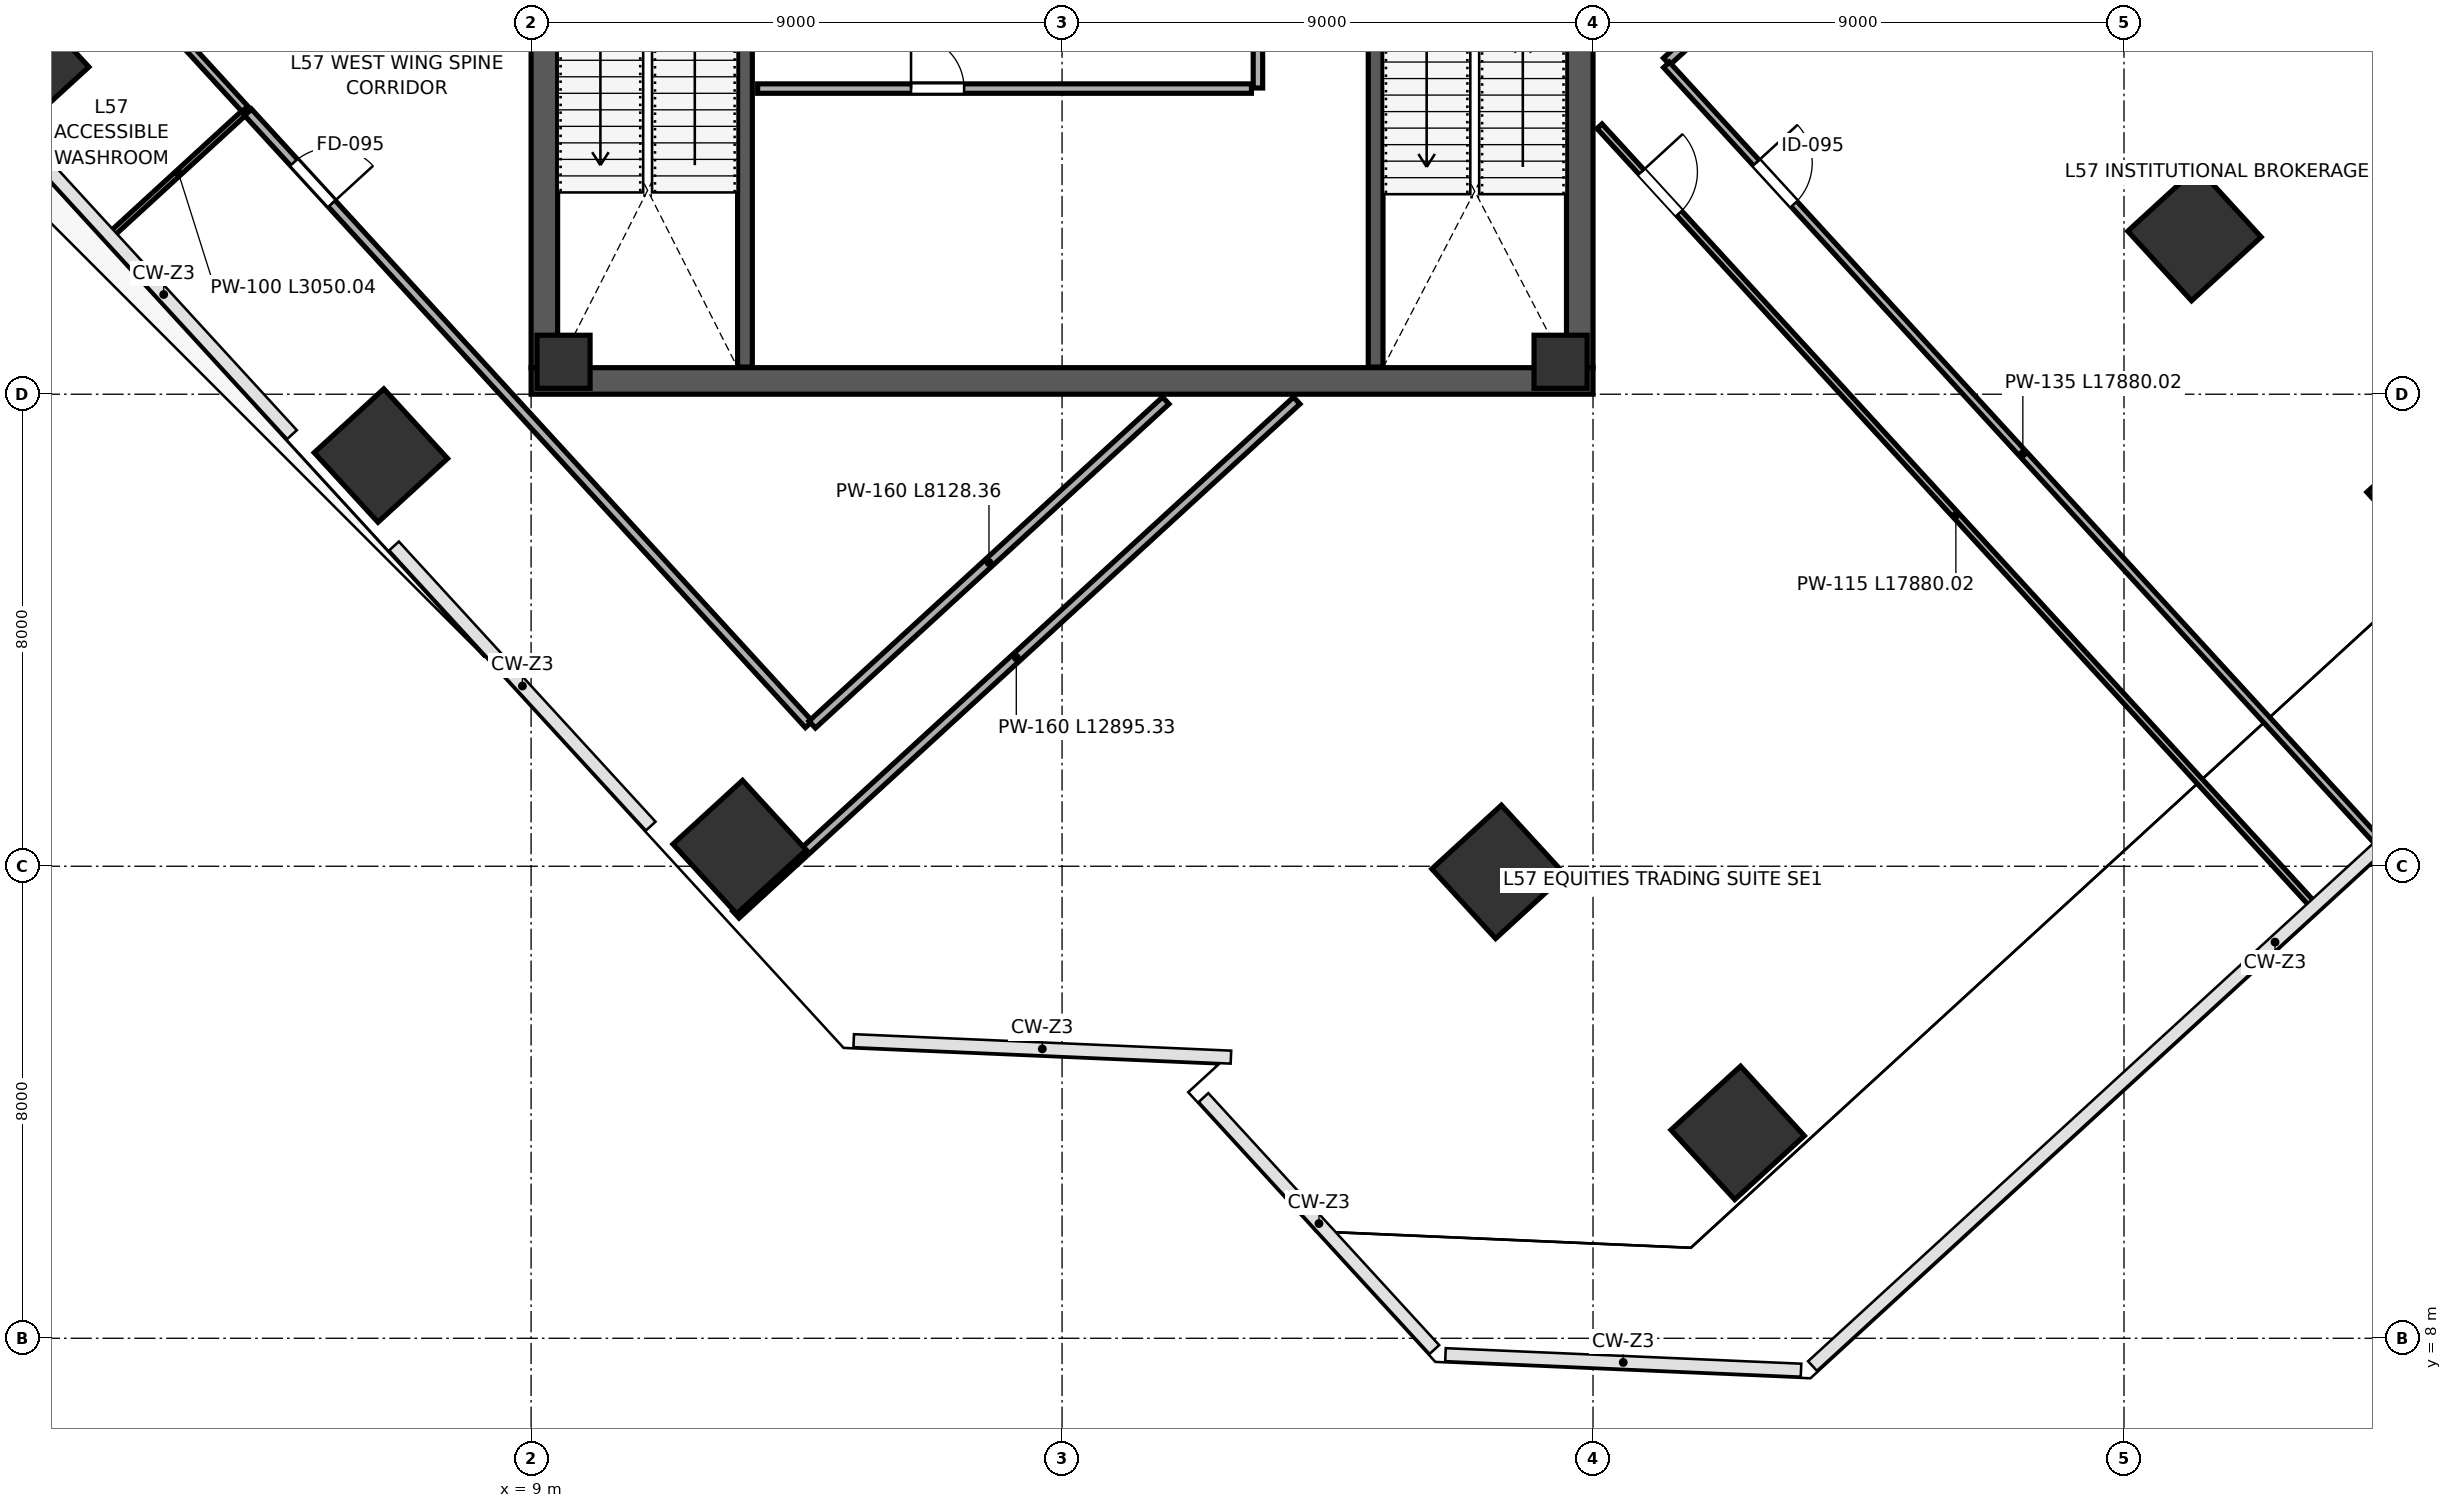
"""IFC4 building model, lengths in metres.
Left out: names, types, materials, properties, quantities, classifications, styles, units other than length and angle.
Written with IfcOpenShell. Run it as: python <this file> out.ifc"""

import sys

from ifc_helpers import new_model, si_unit, direction, frame, frame_2d, origin, origin_2d, place, context, subcontext, project, spatial, rectangle, extrude, source, transform, mapped, element, fill, save


model = new_model("IFC4")
c1 = context("Model", 3, precision=1e-05, world=origin(), true_north=direction((0.0, 1.0)))
c2 = subcontext(c1, "Body", "Model", "MODEL_VIEW")
j1 = project(units=[si_unit("LENGTHUNIT", "METRE"), si_unit("PLANEANGLEUNIT", "RADIAN")], contexts=[c1])
p1 = place(None, origin())
s1 = spatial("IfcSite", under=j1, at=p1, CompositionType="ELEMENT")
p2 = place(p1, origin())
s2 = spatial("IfcBuilding", under=s1, at=p2, CompositionType="ELEMENT")
p3 = place(p2, frame((0.0, 0.0, 254.2)))
s3 = spatial("IfcBuildingStorey", under=s2, at=p3, CompositionType="ELEMENT", Elevation=254.2)
m1 = source(origin(), c2, "Body", "SweptSolid", [
    extrude(rectangle(XDim=0.9, YDim=0.9, at=origin_2d()), origin(), (0.0, 0.0, 1.0), 4.198),
])
for number, where, z_axis, x_axis in (
    (1, (9.55, 24.55, 0.001), (0.0, 0.0, 1.0), (1.0, 0.0, 0.0)),
    (2, (26.45, 24.55, 0.001), (0.0, 0.0, 1.0), (1.0, 0.0, 0.0)),
):
    element("IfcColumn", number, at=place(p3, frame(where, z_axis=z_axis, x_axis=x_axis)), inside=s3, PredefinedType="COLUMN", context=c2, shape_type="MappedRepresentation", body=[
        mapped(m1, transform((0.0, 0.0, 0.0), scale=1.0)),
    ])
m2 = source(origin(), c2, "Body", "SweptSolid", [
    extrude(rectangle(XDim=1.6, YDim=1.6, at=origin_2d()), origin(), (0.0, 0.0, 1.0), 4.198),
])
for number, where, z_axis, x_axis in (
    (3, (0.374, 29.596, 0.001), (0.0, 0.0, 1.0), (-0.676, 0.737, 0.0)),
    (4, (6.454, 22.96, 0.001), (0.0, 0.0, 1.0), (-0.676, 0.737, 0.0)),
    (5, (12.535, 16.325, 0.001), (0.0, 0.0, 1.0), (-0.676, 0.737, 0.0)),
):
    element("IfcColumn", number, at=place(p3, frame(where, z_axis=z_axis, x_axis=x_axis)), inside=s3, PredefinedType="COLUMN", context=c2, shape_type="MappedRepresentation", body=[
        mapped(m2, transform((0.0, 0.0, 0.0), scale=1.0)),
    ])
m3 = source(origin(), c2, "Body", "SweptSolid", [
    extrude(rectangle(XDim=1.6, YDim=1.6, at=origin_2d()), origin(), (0.0, 0.0, 1.0), 4.198),
])
for number, where, z_axis, x_axis in (
    (6, (25.398, 15.905, 0.001), (0.0, 0.0, 1.0), (-0.676, 0.737, 0.0)),
    (7, (37.194, 26.714, 0.001), (0.0, 0.0, 1.0), (-0.676, 0.737, 0.0)),
):
    element("IfcColumn", number, at=place(p3, frame(where, z_axis=z_axis, x_axis=x_axis)), inside=s3, PredefinedType="COLUMN", context=c2, shape_type="MappedRepresentation", body=[
        mapped(m3, transform((0.0, 0.0, 0.0), scale=1.0)),
    ])
for number, where, z_axis, x_axis in (
    (8, (29.451, 11.481, 0.001), (0.0, 0.0, 1.0), (-0.676, 0.737, 0.0)),
    (9, (41.248, 22.291, 0.001), (0.0, 0.0, 1.0), (-0.676, 0.737, 0.0)),
):
    element("IfcColumn", number, at=place(p3, frame(where, z_axis=z_axis, x_axis=x_axis)), inside=s3, PredefinedType="COLUMN", context=c2, shape_type="MappedRepresentation", body=[
        mapped(m2, transform((0.0, 0.0, 0.0), scale=1.0)),
    ])
p4 = place(p3, frame((9.225, 24.45, 0.0), z_axis=(0.0, 0.0, 1.0), x_axis=(0.0, 1.0, 0.0)))
e10 = element("IfcWall", 10, at=p4, inside=s3, PredefinedType="SHEAR", context=c2, shape_type="SweptSolid", body=[
    extrude(rectangle(XDim=15.1, YDim=0.45, at=frame_2d((7.55, 0.0))), origin(), (0.0, 0.0, 1.0), 3.96),
])
p5 = place(p4, frame((8.7, 0.0, 0.0)))
e11 = element("IfcOpeningElement", 11, at=p5, cuts=e10, PredefinedType="OPENING", context=c2, shape_type="SweptSolid", body=[
    extrude(rectangle(XDim=1.15, YDim=2.2, at=frame_2d((0.575, 1.1))), frame((0.0, 0.235, 0.0), z_axis=(0.0, -1.0, 0.0), x_axis=(1.0, 0.0, 0.0)), (0.0, 0.0, 1.0), 0.47),
])
p6 = place(p3, frame((26.775, 24.45, 0.0), z_axis=(0.0, 0.0, 1.0), x_axis=(0.0, 1.0, 0.0)))
e12 = element("IfcWall", 12, at=p6, inside=s3, PredefinedType="SHEAR", context=c2, shape_type="SweptSolid", body=[
    extrude(rectangle(XDim=15.1, YDim=0.45, at=frame_2d((7.55, 0.0))), origin(), (0.0, 0.0, 1.0), 3.96),
])
p7 = place(p6, frame((8.6, 0.0, 0.0)))
e13 = element("IfcOpeningElement", 13, at=p7, cuts=e12, PredefinedType="OPENING", context=c2, shape_type="SweptSolid", body=[
    extrude(rectangle(XDim=1.15, YDim=2.2, at=frame_2d((0.575, 1.1))), frame((0.0, 0.235, 0.0), z_axis=(0.0, -1.0, 0.0), x_axis=(1.0, 0.0, 0.0)), (0.0, 0.0, 1.0), 0.47),
])
p8 = place(p3, frame((9.0, 24.225, 0.0), z_axis=(0.0, 0.0, 1.0), x_axis=(1.0, 0.0, 0.0)))
e14 = element("IfcWall", 14, at=p8, inside=s3, PredefinedType="SHEAR", context=c2, shape_type="SweptSolid", body=[
    extrude(rectangle(XDim=18.0, YDim=0.45, at=frame_2d((9.0, 0.0))), origin(), (0.0, 0.0, 1.0), 3.96),
])
p9 = place(p3, frame((12.625, 24.46, 0.0), z_axis=(0.0, 0.0, 1.0), x_axis=(0.0, 1.0, 0.0)))
e15 = element("IfcWall", 15, at=p9, inside=s3, PredefinedType="SHEAR", context=c2, shape_type="SweptSolid", body=[
    extrude(rectangle(XDim=7.49, YDim=0.25, at=frame_2d((3.745, 0.0))), origin(), (0.0, 0.0, 1.0), 3.96),
])
p10 = place(p9, frame((5.85, 0.0, 0.0)))
e16 = element("IfcOpeningElement", 16, at=p10, cuts=e15, PredefinedType="OPENING", context=c2, shape_type="SweptSolid", body=[
    extrude(rectangle(XDim=1.15, YDim=2.2, at=frame_2d((0.575, 1.1))), frame((0.0, 0.135, 0.0), z_axis=(0.0, -1.0, 0.0), x_axis=(1.0, 0.0, 0.0)), (0.0, 0.0, 1.0), 0.27),
])
p11 = place(p3, frame((23.315, 24.46, 0.0), z_axis=(0.0, 0.0, 1.0), x_axis=(0.0, 1.0, 0.0)))
e17 = element("IfcWall", 17, at=p11, inside=s3, PredefinedType="SHEAR", context=c2, shape_type="SweptSolid", body=[
    extrude(rectangle(XDim=7.49, YDim=0.25, at=frame_2d((3.745, 0.0))), origin(), (0.0, 0.0, 1.0), 3.96),
])
p12 = place(p3, frame((12.84, 29.18, 0.0), z_axis=(0.0, 0.0, 1.0), x_axis=(1.0, 0.0, 0.0)))
e18 = element("IfcWall", 18, at=p12, inside=s3, PredefinedType="PARTITIONING", context=c2, shape_type="SweptSolid", body=[
    extrude(rectangle(XDim=8.37, YDim=0.16, at=frame_2d((4.185, 0.0))), origin(), (0.0, 0.0, 1.0), 3.96),
])
p13 = place(p12, frame((2.6, 0.0, 0.0)))
e19 = element("IfcOpeningElement", 19, at=p13, cuts=e18, PredefinedType="OPENING", context=c2, shape_type="SweptSolid", body=[
    extrude(rectangle(XDim=0.9, YDim=2.15, at=frame_2d((0.45, 1.075))), frame((0.0, 0.09, 0.0), z_axis=(0.0, -1.0, 0.0), x_axis=(1.0, 0.0, 0.0)), (0.0, 0.0, 1.0), 0.18),
])
p14 = place(p3, frame((21.32, 29.19, 0.0), z_axis=(0.0, 0.0, 1.0), x_axis=(0.0, 1.0, 0.0)))
e20 = element("IfcWall", 20, at=p14, inside=s3, PredefinedType="PARTITIONING", context=c2, shape_type="SweptSolid", body=[
    extrude(rectangle(XDim=2.92, YDim=0.16, at=frame_2d((1.46, 0.0))), origin(), (0.0, 0.0, 1.0), 3.96),
])
p15 = place(p3, frame((-0.231, 29.042, 0.0), z_axis=(0.0, 0.0, 1.0), x_axis=(0.737290351983, 0.675576003772, 0.0)))
e21 = element("IfcWall", 21, at=p15, inside=s3, PredefinedType="PARTITIONING", context=c2, shape_type="SweptSolid", body=[
    extrude(rectangle(XDim=3.05, YDim=0.115, at=frame_2d((1.525, 0.0))), origin(), (0.0, 0.0, 1.0), 3.295),
])
p16 = place(p3, frame((1.897, 26.719, 0.0), z_axis=(0.0, 0.0, 1.0), x_axis=(0.737290351983, 0.675576003772, 0.0)))
e22 = element("IfcWall", 22, at=p16, inside=s3, PredefinedType="PARTITIONING", context=c2, shape_type="SweptSolid", body=[
    extrude(rectangle(XDim=3.05, YDim=0.1, at=frame_2d((1.525, 0.0))), origin(), (0.0, 0.0, 1.0), 3.295),
])
p17 = place(p3, frame((-0.474, 33.881, 0.0), z_axis=(0.0, 0.0, 1.0), x_axis=(0.675605050901, -0.73726373517, 0.0)))
e23 = element("IfcWall", 23, at=p17, inside=s3, PredefinedType="PARTITIONING", context=c2, shape_type="SweptSolid", body=[
    extrude(rectangle(XDim=6.842, YDim=0.135, at=frame_2d((3.421, 0.0))), origin(), (0.0, 0.0, 1.0), 3.96),
])
p18 = place(p17, frame((2.32, 0.0, 0.0)))
e24 = element("IfcOpeningElement", 24, at=p18, cuts=e23, PredefinedType="OPENING", context=c2, shape_type="SweptSolid", body=[
    extrude(rectangle(XDim=0.9, YDim=2.15, at=frame_2d((0.45, 1.075))), frame((0.0, 0.078, 0.0), z_axis=(0.0, -1.0, 0.0), x_axis=(1.0, 0.0, 0.0)), (0.0, 0.0, 1.0), 0.155),
])
p19 = place(p17, frame((4.42, 0.0, 0.0)))
e25 = element("IfcOpeningElement", 25, at=p19, cuts=e23, PredefinedType="OPENING", context=c2, shape_type="SweptSolid", body=[
    extrude(rectangle(XDim=0.95, YDim=2.15, at=frame_2d((0.475, 1.075))), frame((0.0, 0.078, 0.0), z_axis=(0.0, -1.0, 0.0), x_axis=(1.0, 0.0, 0.0)), (0.0, 0.0, 1.0), 0.155),
])
p20 = place(p3, frame((4.203, 28.778, 0.0), z_axis=(0.0, 0.0, 1.0), x_axis=(0.675591041558, -0.737276572642, 0.0)))
e26 = element("IfcWall", 26, at=p20, inside=s3, PredefinedType="PARTITIONING", context=c2, shape_type="SweptSolid", body=[
    extrude(rectangle(XDim=14.07, YDim=0.16, at=frame_2d((7.035, 0.0))), origin(), (0.0, 0.0, 1.0), 3.96),
])
p21 = place(p20, frame((1.15, 0.0, 0.0)))
e27 = element("IfcOpeningElement", 27, at=p21, cuts=e26, PredefinedType="OPENING", context=c2, shape_type="SweptSolid", body=[
    extrude(rectangle(XDim=0.95, YDim=2.15, at=frame_2d((0.475, 1.075))), frame((0.0, 0.09, 0.0), z_axis=(0.0, -1.0, 0.0), x_axis=(1.0, 0.0, 0.0)), (0.0, 0.0, 1.0), 0.18),
])
p22 = place(p3, frame((13.765, 18.402, 0.0), z_axis=(0.0, 0.0, 1.0), x_axis=(0.737266340408, 0.675602207887, 0.0)))
e28 = element("IfcWall", 28, at=p22, inside=s3, PredefinedType="PARTITIONING", context=c2, shape_type="SweptSolid", body=[
    extrude(rectangle(XDim=8.128, YDim=0.16, at=frame_2d((4.064, 0.0))), origin(), (0.0, 0.0, 1.0), 3.96),
])
p23 = place(p3, frame((28.248, 29.639, 0.0), z_axis=(0.0, 0.0, 1.0), x_axis=(0.73728000412, 0.675587296746, 0.0)))
e29 = element("IfcWall", 29, at=p23, inside=s3, PredefinedType="PARTITIONING", context=c2, shape_type="SweptSolid", body=[
    extrude(rectangle(XDim=12.64, YDim=0.16, at=frame_2d((6.32, 0.0))), origin(), (0.0, 0.0, 1.0), 3.295),
])
p24 = place(p3, frame((12.47, 15.181, 0.0), z_axis=(0.0, 0.0, 1.0), x_axis=(0.737265724175, 0.675602880365, 0.0)))
e30 = element("IfcWall", 30, at=p24, inside=s3, PredefinedType="PARTITIONING", context=c2, shape_type="SweptSolid", body=[
    extrude(rectangle(XDim=12.895, YDim=0.16, at=frame_2d((6.448, 0.0))), origin(), (0.0, 0.0, 1.0), 3.96),
])
p25 = place(p3, frame((28.246, 29.582, 0.0), z_axis=(0.0, 0.0, 1.0), x_axis=(0.67559539026, -0.737272587758, 0.0)))
e31 = element("IfcWall", 31, at=p25, inside=s3, PredefinedType="PARTITIONING", context=c2, shape_type="SweptSolid", body=[
    extrude(rectangle(XDim=17.88, YDim=0.135, at=frame_2d((8.94, 0.0))), origin(), (0.0, 0.0, 1.0), 3.252),
])
p26 = place(p25, frame((2.25, 0.0, 0.0)))
e32 = element("IfcOpeningElement", 32, at=p26, cuts=e31, PredefinedType="OPENING", context=c2, shape_type="SweptSolid", body=[
    extrude(rectangle(XDim=0.95, YDim=2.15, at=frame_2d((0.475, 1.075))), frame((0.0, 0.078, 0.0), z_axis=(0.0, -1.0, 0.0), x_axis=(1.0, 0.0, 0.0)), (0.0, 0.0, 1.0), 0.155),
])
p27 = place(p3, frame((27.11, 28.542, 0.0), z_axis=(0.0, 0.0, 1.0), x_axis=(0.675588589041, -0.737278819957, 0.0)))
e33 = element("IfcWall", 33, at=p27, inside=s3, PredefinedType="PARTITIONING", context=c2, shape_type="SweptSolid", body=[
    extrude(rectangle(XDim=17.88, YDim=0.115, at=frame_2d((8.94, 0.0))), origin(), (0.0, 0.0, 1.0), 3.252),
])
p28 = place(p27, frame((1.05, 0.0, 0.0)))
e34 = element("IfcOpeningElement", 34, at=p28, cuts=e33, PredefinedType="OPENING", context=c2, shape_type="SweptSolid", body=[
    extrude(rectangle(XDim=0.95, YDim=2.15, at=frame_2d((0.475, 1.075))), frame((0.0, 0.067, 0.0), z_axis=(0.0, -1.0, 0.0), x_axis=(1.0, 0.0, 0.0)), (0.0, 0.0, 1.0), 0.135),
])
m4 = source(origin(), c2, "Body", "SweptSolid", [
    extrude(rectangle(XDim=0.9, YDim=2.15, at=frame_2d((0.45, 1.075))), frame((0.0, 0.025, 0.0), z_axis=(0.0, -1.0, 0.0), x_axis=(1.0, 0.0, 0.0)), (0.0, 0.0, 1.0), 0.05),
])
p29 = place(p13, origin())
e35 = element("IfcDoor", 35, at=p29, inside=s3, OperationType="SINGLE_SWING_LEFT", PredefinedType="DOOR", context=c2, shape_type="MappedRepresentation", body=[
    mapped(m4, transform((0.0, 0.0, 0.0), scale=1.0)),
])
fill(e19, e35)
m5 = source(origin(), c2, "Body", "SweptSolid", [
    extrude(rectangle(XDim=0.95, YDim=2.15, at=frame_2d((0.475, 1.075))), frame((0.0, 0.025, 0.0), z_axis=(0.0, -1.0, 0.0), x_axis=(1.0, 0.0, 0.0)), (0.0, 0.0, 1.0), 0.05),
])
p30 = place(p21, origin())
e36 = element("IfcDoor", 36, at=p30, inside=s3, OperationType="SINGLE_SWING_RIGHT", PredefinedType="DOOR", context=c2, shape_type="MappedRepresentation", body=[
    mapped(m5, transform((0.0, 0.0, 0.0), scale=1.0)),
])
fill(e27, e36)
m6 = source(origin(), c2, "Body", "SweptSolid", [
    extrude(rectangle(XDim=0.95, YDim=2.15, at=frame_2d((0.475, 1.075))), frame((0.0, 0.025, 0.0), z_axis=(0.0, -1.0, 0.0), x_axis=(1.0, 0.0, 0.0)), (0.0, 0.0, 1.0), 0.05),
])
p31 = place(p26, origin())
e37 = element("IfcDoor", 37, at=p31, inside=s3, OperationType="SINGLE_SWING_LEFT", PredefinedType="DOOR", context=c2, shape_type="MappedRepresentation", body=[
    mapped(m6, transform((0.0, 0.0, 0.0), scale=1.0)),
])
fill(e32, e37)
p32 = place(p28, origin())
e38 = element("IfcDoor", 38, at=p32, inside=s3, OperationType="SINGLE_SWING_LEFT", PredefinedType="DOOR", context=c2, shape_type="MappedRepresentation", body=[
    mapped(m6, transform((0.0, 0.0, 0.0), scale=1.0)),
])
fill(e34, e38)
save(model, sys.argv[1])
